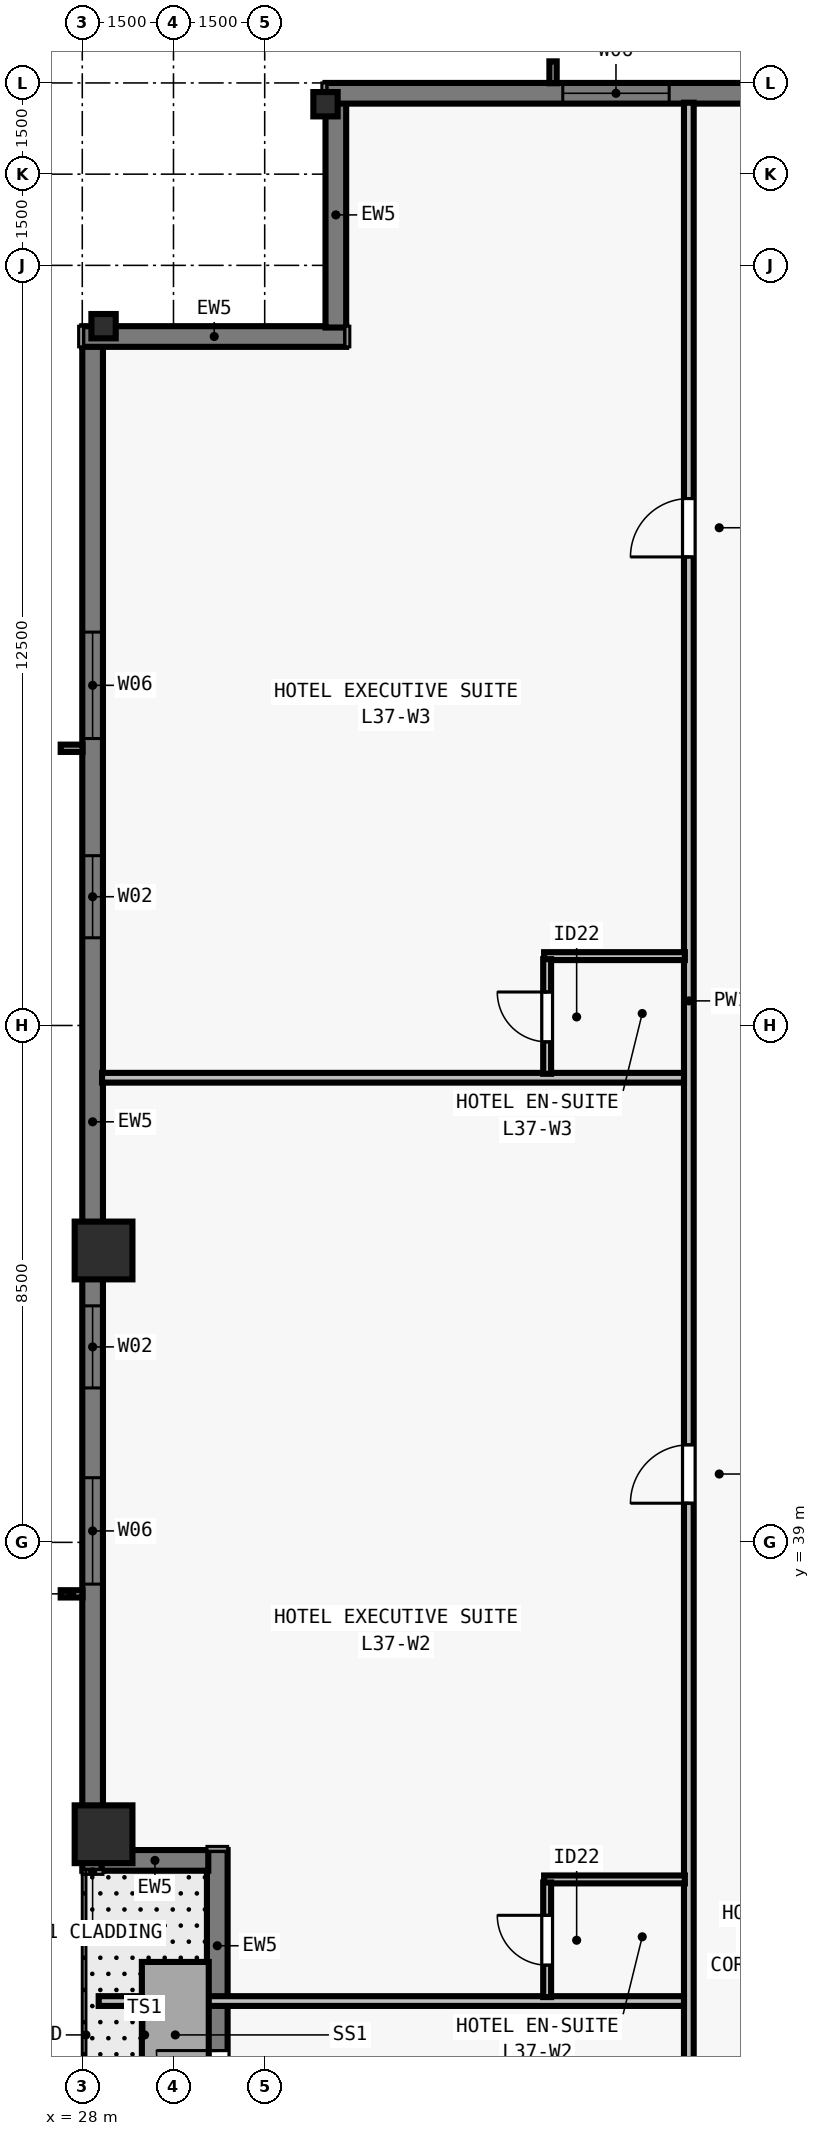
"""IFC4 building model, lengths in metres.
Left out: names, types, materials, properties, quantities, classifications, styles, units other than length and angle.
Written with IfcOpenShell. Run it as: python <this file> out.ifc"""

import sys

from ifc_helpers import new_model, si_unit, direction, frame, frame_2d, origin, origin_2d, place, context, subcontext, project, spatial, rectangle, i_section, extrude, element, fill, save


model = new_model("IFC4")
c1 = context("Model", 3, precision=1e-05, world=origin(), true_north=direction((0.0, 1.0)))
c2 = subcontext(c1, "Body", "Model", "MODEL_VIEW")
j1 = project(units=[si_unit("LENGTHUNIT", "METRE"), si_unit("PLANEANGLEUNIT", "RADIAN")], contexts=[c1])
p1 = place(None, origin())
s1 = spatial("IfcSite", under=j1, at=p1, CompositionType="ELEMENT")
p2 = place(p1, origin())
s2 = spatial("IfcBuilding", under=s1, at=p2, CompositionType="ELEMENT")
p3 = place(p2, frame((0.0, 0.0, 137.5)))
s3 = spatial("IfcBuildingStorey", under=s2, at=p3, CompositionType="ELEMENT", Elevation=137.5)
for number, where, z_axis, x_axis in (
    (1, (32.0, 62.65, 0.0), (0.0, 0.0, 1.0), (1.0, 0.0, 0.0)),
    (2, (28.35, 59.0, 0.0), (0.0, 0.0, 1.0), (0.0, 1.0, 0.0)),
):
    element("IfcColumn", number, at=place(p3, frame(where, z_axis=z_axis, x_axis=x_axis)), inside=s3, PredefinedType="COLUMN", context=c2, shape_type="SweptSolid", body=[
        extrude(i_section(OverallWidth=0.4, OverallDepth=0.4, WebThickness=0.022, FlangeThickness=0.036, at=origin_2d()), origin(), (0.0, 0.0, 1.0), 3.5),
    ])
for number, where, z_axis, x_axis in (
    (3, (28.35, 43.8, 0.0), (0.0, 0.0, 1.0), (0.0, 1.0, 0.0)),
    (4, (28.35, 34.2, 0.0), (0.0, 0.0, 1.0), (0.0, 1.0, 0.0)),
):
    element("IfcColumn", number, at=place(p3, frame(where, z_axis=z_axis, x_axis=x_axis)), inside=s3, PredefinedType="COLUMN", context=c2, shape_type="SweptSolid", body=[
        extrude(rectangle(XDim=0.95, YDim=0.95, at=origin_2d()), origin(), (0.0, 0.0, 1.0), 3.5),
    ])
p4 = place(p3, frame((28.17, 33.6, 0.0), z_axis=(0.0, 0.0, 1.0), x_axis=(0.0, 1.0, 0.0)))
e5 = element("IfcWall", 5, at=p4, inside=s3, PredefinedType="SOLIDWALL", context=c2, shape_type="SweptSolid", body=[
    extrude(rectangle(XDim=25.082, YDim=0.34, at=frame_2d((12.541, 0.0))), origin(), (0.0, 0.0, 1.0), 3.28),
])
p5 = place(p4, frame((4.713, 0.0, 0.8)))
e6 = element("IfcOpeningElement", 6, at=p5, cuts=e5, PredefinedType="OPENING", context=c2, shape_type="SweptSolid", body=[
    extrude(rectangle(XDim=1.75, YDim=1.66, at=frame_2d((0.875, 0.83))), frame((0.0, 0.18, 0.0), z_axis=(0.0, -1.0, 0.0), x_axis=(1.0, 0.0, 0.0)), (0.0, 0.0, 1.0), 0.36),
])
p6 = place(p4, frame((7.94, 0.0, 0.8)))
e7 = element("IfcOpeningElement", 7, at=p6, cuts=e5, PredefinedType="OPENING", context=c2, shape_type="SweptSolid", body=[
    extrude(rectangle(XDim=1.35, YDim=1.66, at=frame_2d((0.675, 0.83))), frame((0.0, 0.18, 0.0), z_axis=(0.0, -1.0, 0.0), x_axis=(1.0, 0.0, 0.0)), (0.0, 0.0, 1.0), 0.36),
])
p7 = place(p4, frame((15.342, 0.0, 0.8)))
e8 = element("IfcOpeningElement", 8, at=p7, cuts=e5, PredefinedType="OPENING", context=c2, shape_type="SweptSolid", body=[
    extrude(rectangle(XDim=1.35, YDim=1.66, at=frame_2d((0.675, 0.83))), frame((0.0, 0.18, 0.0), z_axis=(0.0, -1.0, 0.0), x_axis=(1.0, 0.0, 0.0)), (0.0, 0.0, 1.0), 0.36),
])
p8 = place(p4, frame((18.619, 0.0, 0.8)))
e9 = element("IfcOpeningElement", 9, at=p8, cuts=e5, PredefinedType="OPENING", context=c2, shape_type="SweptSolid", body=[
    extrude(rectangle(XDim=1.75, YDim=1.66, at=frame_2d((0.875, 0.83))), frame((0.0, 0.18, 0.0), z_axis=(0.0, -1.0, 0.0), x_axis=(1.0, 0.0, 0.0)), (0.0, 0.0, 1.0), 0.36),
])
p9 = place(p3, frame((28.0, 58.83, 0.0), z_axis=(0.0, 0.0, 1.0), x_axis=(1.0, 0.0, 0.0)))
e10 = element("IfcWall", 10, at=p9, inside=s3, PredefinedType="SOLIDWALL", context=c2, shape_type="SweptSolid", body=[
    extrude(rectangle(XDim=4.34, YDim=0.34, at=frame_2d((2.17, 0.0))), origin(), (0.0, 0.0, 1.0), 3.28),
])
p10 = place(p3, frame((32.17, 58.978, 0.0), z_axis=(0.0, 0.0, 1.0), x_axis=(0.0, 1.0, 0.0)))
e11 = element("IfcWall", 11, at=p10, inside=s3, PredefinedType="SOLIDWALL", context=c2, shape_type="SweptSolid", body=[
    extrude(rectangle(XDim=3.704, YDim=0.34, at=frame_2d((1.852, 0.0))), origin(), (0.0, 0.0, 1.0), 3.28),
])
p11 = place(p3, frame((32.0, 62.83, 0.0), z_axis=(0.0, 0.0, 1.0), x_axis=(1.0, 0.0, 0.0)))
e12 = element("IfcWall", 12, at=p11, inside=s3, PredefinedType="SOLIDWALL", context=c2, shape_type="SweptSolid", body=[
    extrude(rectangle(XDim=39.682, YDim=0.34, at=frame_2d((19.841, 0.0))), origin(), (0.0, 0.0, 1.0), 3.28),
])
p12 = place(p11, frame((3.902, 0.0, 0.8)))
e13 = element("IfcOpeningElement", 13, at=p12, cuts=e12, PredefinedType="OPENING", context=c2, shape_type="SweptSolid", body=[
    extrude(rectangle(XDim=1.75, YDim=1.66, at=frame_2d((0.875, 0.83))), frame((0.0, 0.18, 0.0), z_axis=(0.0, -1.0, 0.0), x_axis=(1.0, 0.0, 0.0)), (0.0, 0.0, 1.0), 0.36),
])
p13 = place(p11, frame((8.505, 0.0, 0.8)))
e14 = element("IfcOpeningElement", 14, at=p13, cuts=e12, PredefinedType="OPENING", context=c2, shape_type="SweptSolid", body=[
    extrude(rectangle(XDim=1.35, YDim=1.66, at=frame_2d((0.675, 0.83))), frame((0.0, 0.18, 0.0), z_axis=(0.0, -1.0, 0.0), x_axis=(1.0, 0.0, 0.0)), (0.0, 0.0, 1.0), 0.36),
])
p14 = place(p11, frame((11.859, 0.0, 0.8)))
e15 = element("IfcOpeningElement", 15, at=p14, cuts=e12, PredefinedType="OPENING", context=c2, shape_type="SweptSolid", body=[
    extrude(rectangle(XDim=1.75, YDim=1.66, at=frame_2d((0.875, 0.83))), frame((0.0, 0.18, 0.0), z_axis=(0.0, -1.0, 0.0), x_axis=(1.0, 0.0, 0.0)), (0.0, 0.0, 1.0), 0.36),
])
p15 = place(p11, frame((16.062, 0.0, 0.8)))
e16 = element("IfcOpeningElement", 16, at=p15, cuts=e12, PredefinedType="OPENING", context=c2, shape_type="SweptSolid", body=[
    extrude(rectangle(XDim=1.35, YDim=1.66, at=frame_2d((0.675, 0.83))), frame((0.0, 0.18, 0.0), z_axis=(0.0, -1.0, 0.0), x_axis=(1.0, 0.0, 0.0)), (0.0, 0.0, 1.0), 0.36),
])
p16 = place(p11, frame((17.716, 0.0, 0.8)))
e17 = element("IfcOpeningElement", 17, at=p16, cuts=e12, PredefinedType="OPENING", context=c2, shape_type="SweptSolid", body=[
    extrude(rectangle(XDim=1.75, YDim=1.66, at=frame_2d((0.875, 0.83))), frame((0.0, 0.18, 0.0), z_axis=(0.0, -1.0, 0.0), x_axis=(1.0, 0.0, 0.0)), (0.0, 0.0, 1.0), 0.36),
])
p17 = place(p11, frame((22.719, 0.0, 0.8)))
e18 = element("IfcOpeningElement", 18, at=p17, cuts=e12, PredefinedType="OPENING", context=c2, shape_type="SweptSolid", body=[
    extrude(rectangle(XDim=1.35, YDim=1.66, at=frame_2d((0.675, 0.83))), frame((0.0, 0.18, 0.0), z_axis=(0.0, -1.0, 0.0), x_axis=(1.0, 0.0, 0.0)), (0.0, 0.0, 1.0), 0.36),
])
p18 = place(p11, frame((26.073, 0.0, 0.8)))
e19 = element("IfcOpeningElement", 19, at=p18, cuts=e12, PredefinedType="OPENING", context=c2, shape_type="SweptSolid", body=[
    extrude(rectangle(XDim=1.75, YDim=1.66, at=frame_2d((0.875, 0.83))), frame((0.0, 0.18, 0.0), z_axis=(0.0, -1.0, 0.0), x_axis=(1.0, 0.0, 0.0)), (0.0, 0.0, 1.0), 0.36),
])
p19 = place(p11, frame((30.677, 0.0, 0.8)))
e20 = element("IfcOpeningElement", 20, at=p19, cuts=e12, PredefinedType="OPENING", context=c2, shape_type="SweptSolid", body=[
    extrude(rectangle(XDim=1.35, YDim=1.66, at=frame_2d((0.675, 0.83))), frame((0.0, 0.18, 0.0), z_axis=(0.0, -1.0, 0.0), x_axis=(1.0, 0.0, 0.0)), (0.0, 0.0, 1.0), 0.36),
])
p20 = place(p11, frame((33.18, 0.0, 0.8)))
e21 = element("IfcOpeningElement", 21, at=p20, cuts=e12, PredefinedType="OPENING", context=c2, shape_type="SweptSolid", body=[
    extrude(rectangle(XDim=1.75, YDim=1.66, at=frame_2d((0.875, 0.83))), frame((0.0, 0.18, 0.0), z_axis=(0.0, -1.0, 0.0), x_axis=(1.0, 0.0, 0.0)), (0.0, 0.0, 1.0), 0.36),
])
p21 = place(p3, frame((30.22, 28.178, 0.0), z_axis=(0.0, 0.0, 1.0), x_axis=(0.0, 1.0, 0.0)))
e22 = element("IfcWall", 22, at=p21, inside=s3, PredefinedType="SOLIDWALL", context=c2, shape_type="SweptSolid", body=[
    extrude(rectangle(XDim=5.762, YDim=0.34, at=frame_2d((2.881, 0.0))), origin(), (0.0, 0.0, 1.0), 3.28),
])
p22 = place(p21, frame((1.465, 0.0, 0.0)))
e23 = element("IfcOpeningElement", 23, at=p22, cuts=e22, PredefinedType="OPENING", context=c2, shape_type="SweptSolid", body=[
    extrude(rectangle(XDim=1.0, YDim=2.15, at=frame_2d((0.5, 1.075))), frame((0.0, 0.18, 0.0), z_axis=(0.0, -1.0, 0.0), x_axis=(1.0, 0.0, 0.0)), (0.0, 0.0, 1.0), 0.36),
])
p23 = place(p3, frame((30.072, 33.77, 0.0), z_axis=(0.0, 0.0, 1.0), x_axis=(-1.0, 0.0, 0.0)))
e24 = element("IfcWall", 24, at=p23, inside=s3, PredefinedType="SOLIDWALL", context=c2, shape_type="SweptSolid", body=[
    extrude(rectangle(XDim=1.754, YDim=0.34, at=frame_2d((0.877, 0.0))), origin(), (0.0, 0.0, 1.0), 3.28),
])
p24 = place(p3, frame((37.975, 15.325, 0.0), z_axis=(0.0, 0.0, 1.0), x_axis=(0.0, 1.0, 0.0)))
e25 = element("IfcWall", 25, at=p24, inside=s3, PredefinedType="PARTITIONING", context=c2, shape_type="SweptSolid", body=[
    extrude(rectangle(XDim=47.35, YDim=0.16, at=frame_2d((23.675, 0.0))), origin(), (0.0, 0.0, 1.0), 2.555),
])
p25 = place(p24, frame((8.934, 0.0, 0.0)))
e26 = element("IfcOpeningElement", 26, at=p25, cuts=e25, PredefinedType="OPENING", context=c2, shape_type="SweptSolid", body=[
    extrude(rectangle(XDim=0.96, YDim=2.15, at=frame_2d((0.48, 1.075))), frame((0.0, 0.09, 0.0), z_axis=(0.0, -1.0, 0.0), x_axis=(1.0, 0.0, 0.0)), (0.0, 0.0, 1.0), 0.18),
])
p26 = place(p24, frame((24.319, 0.0, 0.0)))
e27 = element("IfcOpeningElement", 27, at=p26, cuts=e25, PredefinedType="OPENING", context=c2, shape_type="SweptSolid", body=[
    extrude(rectangle(XDim=0.96, YDim=2.15, at=frame_2d((0.48, 1.075))), frame((0.0, 0.09, 0.0), z_axis=(0.0, -1.0, 0.0), x_axis=(1.0, 0.0, 0.0)), (0.0, 0.0, 1.0), 0.18),
])
p27 = place(p24, frame((39.88, 0.0, 0.0)))
e28 = element("IfcOpeningElement", 28, at=p27, cuts=e25, PredefinedType="OPENING", context=c2, shape_type="SweptSolid", body=[
    extrude(rectangle(XDim=0.96, YDim=2.15, at=frame_2d((0.48, 1.075))), frame((0.0, 0.09, 0.0), z_axis=(0.0, -1.0, 0.0), x_axis=(1.0, 0.0, 0.0)), (0.0, 0.0, 1.0), 0.18),
])
p28 = place(p3, frame((28.27, 31.457, 0.0), z_axis=(0.0, 0.0, 1.0), x_axis=(1.0, 0.0, 0.0)))
e29 = element("IfcWall", 29, at=p28, inside=s3, PredefinedType="PARTITIONING", context=c2, shape_type="SweptSolid", body=[
    extrude(rectangle(XDim=9.625, YDim=0.16, at=frame_2d((4.812, 0.0))), origin(), (0.0, 0.0, 1.0), 3.28),
])
p29 = place(p3, frame((35.595, 33.457, 0.0), z_axis=(0.0, 0.0, 1.0), x_axis=(1.0, 0.0, 0.0)))
e30 = element("IfcWall", 30, at=p29, inside=s3, PredefinedType="PLUMBINGWALL", context=c2, shape_type="SweptSolid", body=[
    extrude(rectangle(XDim=2.315, YDim=0.13, at=frame_2d((1.157, 0.0))), origin(), (0.0, 0.0, 1.0), 3.28),
])
p30 = place(p3, frame((35.645, 31.522, 0.0), z_axis=(0.0, 0.0, 1.0), x_axis=(0.0, 1.0, 0.0)))
e31 = element("IfcWall", 31, at=p30, inside=s3, PredefinedType="PLUMBINGWALL", context=c2, shape_type="SweptSolid", body=[
    extrude(rectangle(XDim=1.885, YDim=0.13, at=frame_2d((0.942, 0.0))), origin(), (0.0, 0.0, 1.0), 3.28),
])
p31 = place(p30, frame((0.525, 0.0, 0.0)))
e32 = element("IfcOpeningElement", 32, at=p31, cuts=e31, PredefinedType="OPENING", context=c2, shape_type="SweptSolid", body=[
    extrude(rectangle(XDim=0.82, YDim=2.1, at=frame_2d((0.41, 1.05))), frame((0.0, 0.075, 0.0), z_axis=(0.0, -1.0, 0.0), x_axis=(1.0, 0.0, 0.0)), (0.0, 0.0, 1.0), 0.15),
])
p32 = place(p3, frame((28.325, 46.641, 0.0), z_axis=(0.0, 0.0, 1.0), x_axis=(1.0, 0.0, 0.0)))
e33 = element("IfcWall", 33, at=p32, inside=s3, PredefinedType="PARTITIONING", context=c2, shape_type="SweptSolid", body=[
    extrude(rectangle(XDim=9.57, YDim=0.16, at=frame_2d((4.785, 0.0))), origin(), (0.0, 0.0, 1.0), 3.28),
])
p33 = place(p3, frame((35.595, 48.641, 0.0), z_axis=(0.0, 0.0, 1.0), x_axis=(1.0, 0.0, 0.0)))
e34 = element("IfcWall", 34, at=p33, inside=s3, PredefinedType="PLUMBINGWALL", context=c2, shape_type="SweptSolid", body=[
    extrude(rectangle(XDim=2.315, YDim=0.13, at=frame_2d((1.157, 0.0))), origin(), (0.0, 0.0, 1.0), 3.28),
])
p34 = place(p3, frame((35.645, 46.706, 0.0), z_axis=(0.0, 0.0, 1.0), x_axis=(0.0, 1.0, 0.0)))
e35 = element("IfcWall", 35, at=p34, inside=s3, PredefinedType="PLUMBINGWALL", context=c2, shape_type="SweptSolid", body=[
    extrude(rectangle(XDim=1.885, YDim=0.13, at=frame_2d((0.942, 0.0))), origin(), (0.0, 0.0, 1.0), 3.28),
])
p35 = place(p34, frame((0.525, 0.0, 0.0)))
e36 = element("IfcOpeningElement", 36, at=p35, cuts=e35, PredefinedType="OPENING", context=c2, shape_type="SweptSolid", body=[
    extrude(rectangle(XDim=0.82, YDim=2.1, at=frame_2d((0.41, 1.05))), frame((0.0, 0.075, 0.0), z_axis=(0.0, -1.0, 0.0), x_axis=(1.0, 0.0, 0.0)), (0.0, 0.0, 1.0), 0.15),
])
p36 = place(p5, origin())
e37 = element("IfcWindow", 37, at=p36, inside=s3, PartitioningType="SINGLE_PANEL", PredefinedType="WINDOW", context=c2, shape_type="SweptSolid", body=[
    extrude(rectangle(XDim=1.75, YDim=1.66, at=frame_2d((0.875, 0.83))), frame((0.0, -0.05, 0.0), z_axis=(0.0, -1.0, 0.0), x_axis=(1.0, 0.0, 0.0)), (0.0, 0.0, 1.0), 0.06),
])
fill(e6, e37)
p37 = place(p6, origin())
e38 = element("IfcWindow", 38, at=p37, inside=s3, PartitioningType="SINGLE_PANEL", PredefinedType="WINDOW", context=c2, shape_type="SweptSolid", body=[
    extrude(rectangle(XDim=1.35, YDim=1.66, at=frame_2d((0.675, 0.83))), frame((0.0, -0.05, 0.0), z_axis=(0.0, -1.0, 0.0), x_axis=(1.0, 0.0, 0.0)), (0.0, 0.0, 1.0), 0.06),
])
fill(e7, e38)
p38 = place(p7, origin())
e39 = element("IfcWindow", 39, at=p38, inside=s3, PartitioningType="SINGLE_PANEL", PredefinedType="WINDOW", context=c2, shape_type="SweptSolid", body=[
    extrude(rectangle(XDim=1.35, YDim=1.66, at=frame_2d((0.675, 0.83))), frame((0.0, -0.05, 0.0), z_axis=(0.0, -1.0, 0.0), x_axis=(1.0, 0.0, 0.0)), (0.0, 0.0, 1.0), 0.06),
])
fill(e8, e39)
p39 = place(p8, origin())
e40 = element("IfcWindow", 40, at=p39, inside=s3, PartitioningType="SINGLE_PANEL", PredefinedType="WINDOW", context=c2, shape_type="SweptSolid", body=[
    extrude(rectangle(XDim=1.75, YDim=1.66, at=frame_2d((0.875, 0.83))), frame((0.0, -0.05, 0.0), z_axis=(0.0, -1.0, 0.0), x_axis=(1.0, 0.0, 0.0)), (0.0, 0.0, 1.0), 0.06),
])
fill(e9, e40)
p40 = place(p12, origin())
e41 = element("IfcWindow", 41, at=p40, inside=s3, PartitioningType="SINGLE_PANEL", PredefinedType="WINDOW", context=c2, shape_type="SweptSolid", body=[
    extrude(rectangle(XDim=1.75, YDim=1.66, at=frame_2d((0.875, 0.83))), frame((0.0, -0.05, 0.0), z_axis=(0.0, -1.0, 0.0), x_axis=(1.0, 0.0, 0.0)), (0.0, 0.0, 1.0), 0.06),
])
fill(e13, e41)
p41 = place(p22, origin())
e42 = element("IfcDoor", 42, at=p41, inside=s3, OperationType="SINGLE_SWING_RIGHT", PredefinedType="DOOR", context=c2, shape_type="SweptSolid", body=[
    extrude(rectangle(XDim=1.0, YDim=2.15, at=frame_2d((0.5, 1.075))), frame((0.0, 0.025, 0.0), z_axis=(0.0, -1.0, 0.0), x_axis=(1.0, 0.0, 0.0)), (0.0, 0.0, 1.0), 0.05),
])
fill(e23, e42)
p42 = place(p31, origin())
e43 = element("IfcDoor", 43, at=p42, inside=s3, OperationType="SINGLE_SWING_RIGHT", PredefinedType="DOOR", context=c2, shape_type="SweptSolid", body=[
    extrude(rectangle(XDim=0.82, YDim=2.1, at=frame_2d((0.41, 1.05))), frame((0.0, 0.025, 0.0), z_axis=(0.0, -1.0, 0.0), x_axis=(1.0, 0.0, 0.0)), (0.0, 0.0, 1.0), 0.05),
])
fill(e32, e43)
p43 = place(p26, origin())
e44 = element("IfcDoor", 44, at=p43, inside=s3, OperationType="SINGLE_SWING_LEFT", PredefinedType="DOOR", context=c2, shape_type="SweptSolid", body=[
    extrude(rectangle(XDim=0.96, YDim=2.15, at=frame_2d((0.48, 1.075))), frame((0.0, 0.025, 0.0), z_axis=(0.0, -1.0, 0.0), x_axis=(1.0, 0.0, 0.0)), (0.0, 0.0, 1.0), 0.05),
])
fill(e27, e44)
p44 = place(p35, origin())
e45 = element("IfcDoor", 45, at=p44, inside=s3, OperationType="SINGLE_SWING_RIGHT", PredefinedType="DOOR", context=c2, shape_type="SweptSolid", body=[
    extrude(rectangle(XDim=0.82, YDim=2.1, at=frame_2d((0.41, 1.05))), frame((0.0, 0.025, 0.0), z_axis=(0.0, -1.0, 0.0), x_axis=(1.0, 0.0, 0.0)), (0.0, 0.0, 1.0), 0.05),
])
fill(e36, e45)
p45 = place(p27, origin())
e46 = element("IfcDoor", 46, at=p45, inside=s3, OperationType="SINGLE_SWING_LEFT", PredefinedType="DOOR", context=c2, shape_type="SweptSolid", body=[
    extrude(rectangle(XDim=0.96, YDim=2.15, at=frame_2d((0.48, 1.075))), frame((0.0, 0.025, 0.0), z_axis=(0.0, -1.0, 0.0), x_axis=(1.0, 0.0, 0.0)), (0.0, 0.0, 1.0), 0.05),
])
fill(e28, e46)
save(model, sys.argv[1])
